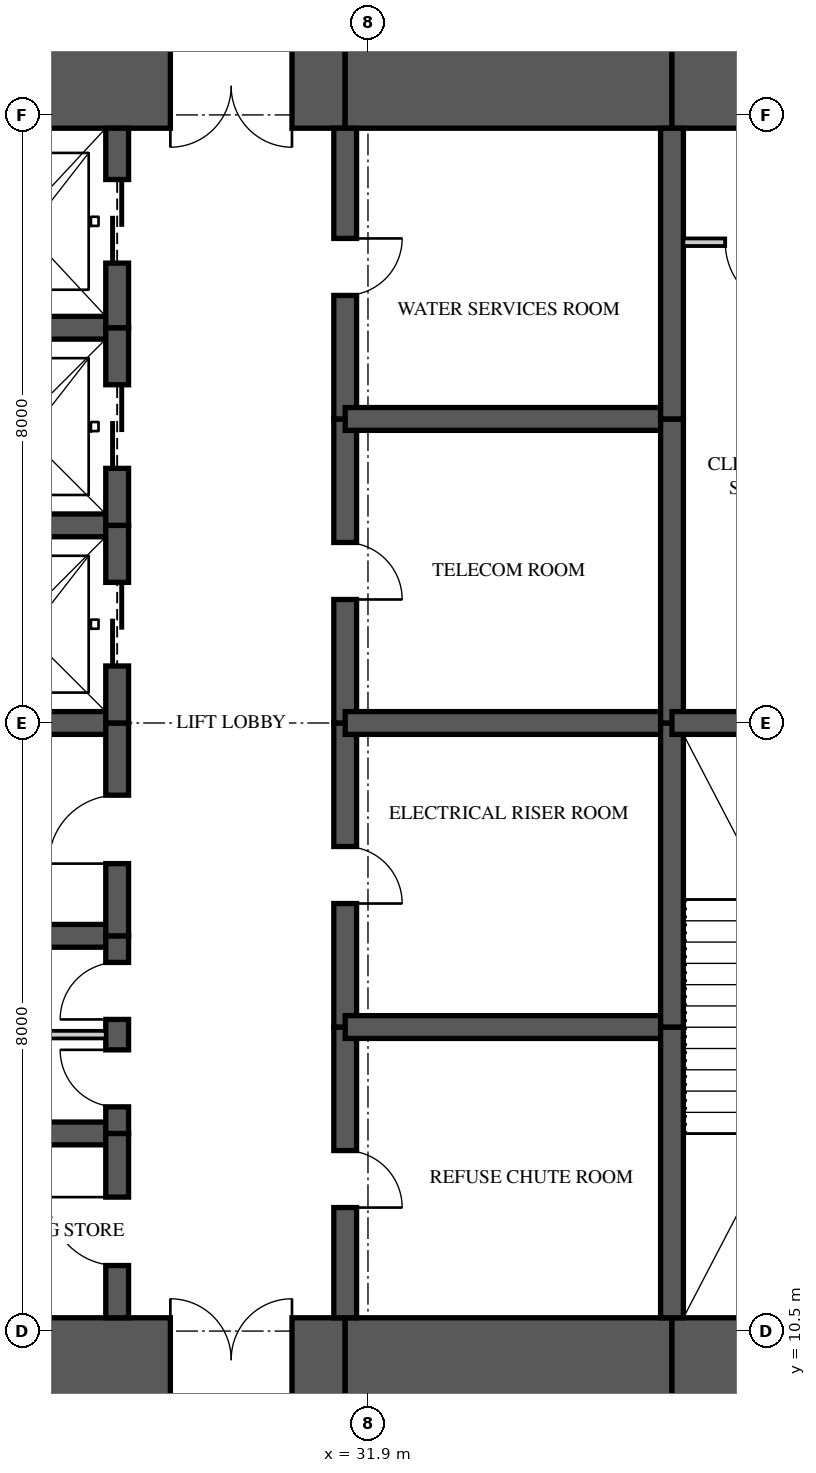
"""IFC4 building model, lengths in metres.
Left out: names, types, materials, properties, quantities, classifications, styles, units other than length and angle.
Written with IfcOpenShell. Run it as: python <this file> out.ifc"""

import sys

from ifc_helpers import new_model, si_unit, direction, frame, frame_2d, origin, place, context, subcontext, project, spatial, rectangle, extrude, element, fill, save


model = new_model("IFC4")
c1 = context("Model", 3, precision=1e-05, world=origin(), true_north=direction((0.0, 1.0)))
c2 = subcontext(c1, "Body", "Model", "MODEL_VIEW")
j1 = project(units=[si_unit("LENGTHUNIT", "METRE"), si_unit("PLANEANGLEUNIT", "RADIAN")], contexts=[c1])
p1 = place(None, origin())
s1 = spatial("IfcSite", under=j1, at=p1, CompositionType="ELEMENT")
p2 = place(p1, origin())
s2 = spatial("IfcBuilding", under=s1, at=p2, CompositionType="ELEMENT")
p3 = place(p2, frame((0.0, 0.0, 224.95)))
s3 = spatial("IfcBuildingStorey", under=s2, at=p3, CompositionType="ELEMENT", Elevation=224.95)
p4 = place(p3, frame((26.0, 10.125, 0.0), z_axis=(0.0, 0.0, 1.0), x_axis=(1.0, 0.0, 0.0)))
e1 = element("IfcWall", 1, at=p4, inside=s3, PredefinedType="SHEAR", context=c2, shape_type="SweptSolid", body=[
    extrude(rectangle(XDim=5.6, YDim=1.1, at=frame_2d((2.8, 0.0))), origin(), (0.0, 0.0, 1.0), 3.5),
])
p5 = place(p4, frame((3.3, 0.0, 0.0)))
e2 = element("IfcOpeningElement", 2, at=p5, cuts=e1, PredefinedType="OPENING", context=c2, shape_type="SweptSolid", body=[
    extrude(rectangle(XDim=1.6, YDim=2.1, at=frame_2d((0.8, 1.05))), frame((0.0, 0.56, 0.0), z_axis=(0.0, -1.0, 0.0), x_axis=(1.0, 0.0, 0.0)), (0.0, 0.0, 1.0), 1.12),
])
p6 = place(p3, frame((31.6, 10.125, 0.0), z_axis=(0.0, 0.0, 1.0), x_axis=(1.0, 0.0, 0.0)))
e3 = element("IfcWall", 3, at=p6, inside=s3, PredefinedType="SHEAR", context=c2, shape_type="SweptSolid", body=[
    extrude(rectangle(XDim=4.3, YDim=1.1, at=frame_2d((2.15, 0.0))), origin(), (0.0, 0.0, 1.0), 3.5),
])
p7 = place(p3, frame((35.9, 10.125, 0.0), z_axis=(0.0, 0.0, 1.0), x_axis=(1.0, 0.0, 0.0)))
e4 = element("IfcWall", 4, at=p7, inside=s3, PredefinedType="SHEAR", context=c2, shape_type="SweptSolid", body=[
    extrude(rectangle(XDim=8.175, YDim=1.1, at=frame_2d((4.087, 0.0))), origin(), (0.0, 0.0, 1.0), 3.5),
])
p8 = place(p7, frame((2.7, 0.0, 0.0)))
e5 = element("IfcOpeningElement", 5, at=p8, cuts=e4, PredefinedType="OPENING", context=c2, shape_type="SweptSolid", body=[
    extrude(rectangle(XDim=1.0, YDim=2.1, at=frame_2d((0.5, 1.05))), frame((0.0, 0.56, 0.0), z_axis=(0.0, -1.0, 0.0), x_axis=(1.0, 0.0, 0.0)), (0.0, 0.0, 1.0), 1.12),
])
p9 = place(p3, frame((44.075, 26.875, 0.0), z_axis=(0.0, 0.0, 1.0), x_axis=(-1.0, 0.0, 0.0)))
e6 = element("IfcWall", 6, at=p9, inside=s3, PredefinedType="SHEAR", context=c2, shape_type="SweptSolid", body=[
    extrude(rectangle(XDim=8.175, YDim=1.1, at=frame_2d((4.087, 0.0))), origin(), (0.0, 0.0, 1.0), 3.5),
])
p10 = place(p9, frame((5.575, 0.0, 0.0)))
e7 = element("IfcOpeningElement", 7, at=p10, cuts=e6, PredefinedType="OPENING", context=c2, shape_type="SweptSolid", body=[
    extrude(rectangle(XDim=0.9, YDim=2.1, at=frame_2d((0.45, 1.05))), frame((0.0, 0.56, 0.0), z_axis=(0.0, -1.0, 0.0), x_axis=(1.0, 0.0, 0.0)), (0.0, 0.0, 1.0), 1.12),
])
p11 = place(p3, frame((35.9, 26.875, 0.0), z_axis=(0.0, 0.0, 1.0), x_axis=(-1.0, 0.0, 0.0)))
e8 = element("IfcWall", 8, at=p11, inside=s3, PredefinedType="SHEAR", context=c2, shape_type="SweptSolid", body=[
    extrude(rectangle(XDim=4.3, YDim=1.1, at=frame_2d((2.15, 0.0))), origin(), (0.0, 0.0, 1.0), 3.5),
])
p12 = place(p3, frame((31.6, 26.875, 0.0), z_axis=(0.0, 0.0, 1.0), x_axis=(-1.0, 0.0, 0.0)))
e9 = element("IfcWall", 9, at=p12, inside=s3, PredefinedType="SHEAR", context=c2, shape_type="SweptSolid", body=[
    extrude(rectangle(XDim=5.6, YDim=1.1, at=frame_2d((2.8, 0.0))), origin(), (0.0, 0.0, 1.0), 3.5),
])
p13 = place(p12, frame((0.7, 0.0, 0.0)))
e10 = element("IfcOpeningElement", 10, at=p13, cuts=e9, PredefinedType="OPENING", context=c2, shape_type="SweptSolid", body=[
    extrude(rectangle(XDim=1.6, YDim=2.1, at=frame_2d((0.8, 1.05))), frame((0.0, 0.56, 0.0), z_axis=(0.0, -1.0, 0.0), x_axis=(1.0, 0.0, 0.0)), (0.0, 0.0, 1.0), 1.12),
])
p14 = place(p3, frame((28.6, 10.675, 0.0), z_axis=(0.0, 0.0, 1.0), x_axis=(0.0, 1.0, 0.0)))
e11 = element("IfcWall", 11, at=p14, inside=s3, PredefinedType="SHEAR", context=c2, shape_type="SweptSolid", body=[
    extrude(rectangle(XDim=2.425, YDim=0.3, at=frame_2d((1.212, 0.0))), origin(), (0.0, 0.0, 1.0), 3.5),
])
p15 = place(p14, frame((0.688, 0.0, 0.0)))
e12 = element("IfcOpeningElement", 12, at=p15, cuts=e11, PredefinedType="OPENING", context=c2, shape_type="SweptSolid", body=[
    extrude(rectangle(XDim=0.9, YDim=2.1, at=frame_2d((0.45, 1.05))), frame((0.0, 0.16, 0.0), z_axis=(0.0, -1.0, 0.0), x_axis=(1.0, 0.0, 0.0)), (0.0, 0.0, 1.0), 0.32),
])
p16 = place(p3, frame((28.6, 13.1, 0.0), z_axis=(0.0, 0.0, 1.0), x_axis=(0.0, 1.0, 0.0)))
e13 = element("IfcWall", 13, at=p16, inside=s3, PredefinedType="SHEAR", context=c2, shape_type="SweptSolid", body=[
    extrude(rectangle(XDim=2.6, YDim=0.3, at=frame_2d((1.3, 0.0))), origin(), (0.0, 0.0, 1.0), 3.5),
])
p17 = place(p16, frame((0.35, 0.0, 0.0)))
e14 = element("IfcOpeningElement", 14, at=p17, cuts=e13, PredefinedType="OPENING", context=c2, shape_type="SweptSolid", body=[
    extrude(rectangle(XDim=0.75, YDim=2.1, at=frame_2d((0.375, 1.05))), frame((0.0, 0.16, 0.0), z_axis=(0.0, -1.0, 0.0), x_axis=(1.0, 0.0, 0.0)), (0.0, 0.0, 1.0), 0.32),
])
p18 = place(p16, frame((1.5, 0.0, 0.0)))
e15 = element("IfcOpeningElement", 15, at=p18, cuts=e13, PredefinedType="OPENING", context=c2, shape_type="SweptSolid", body=[
    extrude(rectangle(XDim=0.75, YDim=2.1, at=frame_2d((0.375, 1.05))), frame((0.0, 0.16, 0.0), z_axis=(0.0, -1.0, 0.0), x_axis=(1.0, 0.0, 0.0)), (0.0, 0.0, 1.0), 0.32),
])
p19 = place(p3, frame((28.6, 15.7, 0.0), z_axis=(0.0, 0.0, 1.0), x_axis=(0.0, 1.0, 0.0)))
e16 = element("IfcWall", 16, at=p19, inside=s3, PredefinedType="SHEAR", context=c2, shape_type="SweptSolid", body=[
    extrude(rectangle(XDim=2.8, YDim=0.3, at=frame_2d((1.4, 0.0))), origin(), (0.0, 0.0, 1.0), 3.5),
])
p20 = place(p19, frame((0.95, 0.0, 0.0)))
e17 = element("IfcOpeningElement", 17, at=p20, cuts=e16, PredefinedType="OPENING", context=c2, shape_type="SweptSolid", body=[
    extrude(rectangle(XDim=0.9, YDim=2.1, at=frame_2d((0.45, 1.05))), frame((0.0, 0.16, 0.0), z_axis=(0.0, -1.0, 0.0), x_axis=(1.0, 0.0, 0.0)), (0.0, 0.0, 1.0), 0.32),
])
p21 = place(p3, frame((28.6, 18.5, 0.0), z_axis=(0.0, 0.0, 1.0), x_axis=(0.0, 1.0, 0.0)))
e18 = element("IfcWall", 18, at=p21, inside=s3, PredefinedType="SHEAR", context=c2, shape_type="SweptSolid", body=[
    extrude(rectangle(XDim=2.6, YDim=0.3, at=frame_2d((1.3, 0.0))), origin(), (0.0, 0.0, 1.0), 3.5),
])
p22 = place(p21, frame((0.75, 0.0, 0.0)))
e19 = element("IfcOpeningElement", 19, at=p22, cuts=e18, PredefinedType="OPENING", context=c2, shape_type="SweptSolid", body=[
    extrude(rectangle(XDim=1.1, YDim=2.1, at=frame_2d((0.55, 1.05))), frame((0.0, 0.16, 0.0), z_axis=(0.0, -1.0, 0.0), x_axis=(1.0, 0.0, 0.0)), (0.0, 0.0, 1.0), 0.32),
])
p23 = place(p3, frame((28.6, 21.1, 0.0), z_axis=(0.0, 0.0, 1.0), x_axis=(0.0, 1.0, 0.0)))
e20 = element("IfcWall", 20, at=p23, inside=s3, PredefinedType="SHEAR", context=c2, shape_type="SweptSolid", body=[
    extrude(rectangle(XDim=2.6, YDim=0.3, at=frame_2d((1.3, 0.0))), origin(), (0.0, 0.0, 1.0), 3.5),
])
p24 = place(p23, frame((0.75, 0.0, 0.0)))
e21 = element("IfcOpeningElement", 21, at=p24, cuts=e20, PredefinedType="OPENING", context=c2, shape_type="SweptSolid", body=[
    extrude(rectangle(XDim=1.1, YDim=2.1, at=frame_2d((0.55, 1.05))), frame((0.0, 0.16, 0.0), z_axis=(0.0, -1.0, 0.0), x_axis=(1.0, 0.0, 0.0)), (0.0, 0.0, 1.0), 0.32),
])
p25 = place(p3, frame((28.6, 23.7, 0.0), z_axis=(0.0, 0.0, 1.0), x_axis=(0.0, 1.0, 0.0)))
e22 = element("IfcWall", 22, at=p25, inside=s3, PredefinedType="SHEAR", context=c2, shape_type="SweptSolid", body=[
    extrude(rectangle(XDim=2.625, YDim=0.3, at=frame_2d((1.312, 0.0))), origin(), (0.0, 0.0, 1.0), 3.5),
])
p26 = place(p25, frame((0.85, 0.0, 0.0)))
e23 = element("IfcOpeningElement", 23, at=p26, cuts=e22, PredefinedType="OPENING", context=c2, shape_type="SweptSolid", body=[
    extrude(rectangle(XDim=1.1, YDim=2.1, at=frame_2d((0.55, 1.05))), frame((0.0, 0.16, 0.0), z_axis=(0.0, -1.0, 0.0), x_axis=(1.0, 0.0, 0.0)), (0.0, 0.0, 1.0), 0.32),
])
p27 = place(p3, frame((31.6, 10.675, 0.0), z_axis=(0.0, 0.0, 1.0), x_axis=(0.0, 1.0, 0.0)))
e24 = element("IfcWall", 24, at=p27, inside=s3, PredefinedType="SHEAR", context=c2, shape_type="SweptSolid", body=[
    extrude(rectangle(XDim=3.825, YDim=0.3, at=frame_2d((1.913, 0.0))), origin(), (0.0, 0.0, 1.0), 3.5),
])
p28 = place(p27, frame((1.45, 0.0, 0.0)))
e25 = element("IfcOpeningElement", 25, at=p28, cuts=e24, PredefinedType="OPENING", context=c2, shape_type="SweptSolid", body=[
    extrude(rectangle(XDim=0.75, YDim=2.1, at=frame_2d((0.375, 1.05))), frame((0.0, 0.16, 0.0), z_axis=(0.0, -1.0, 0.0), x_axis=(1.0, 0.0, 0.0)), (0.0, 0.0, 1.0), 0.32),
])
p29 = place(p3, frame((31.6, 14.5, 0.0), z_axis=(0.0, 0.0, 1.0), x_axis=(0.0, 1.0, 0.0)))
e26 = element("IfcWall", 26, at=p29, inside=s3, PredefinedType="SHEAR", context=c2, shape_type="SweptSolid", body=[
    extrude(rectangle(XDim=4.0, YDim=0.3, at=frame_2d((2.0, 0.0))), origin(), (0.0, 0.0, 1.0), 3.5),
])
p30 = place(p29, frame((1.625, 0.0, 0.0)))
e27 = element("IfcOpeningElement", 27, at=p30, cuts=e26, PredefinedType="OPENING", context=c2, shape_type="SweptSolid", body=[
    extrude(rectangle(XDim=0.75, YDim=2.1, at=frame_2d((0.375, 1.05))), frame((0.0, 0.16, 0.0), z_axis=(0.0, -1.0, 0.0), x_axis=(1.0, 0.0, 0.0)), (0.0, 0.0, 1.0), 0.32),
])
p31 = place(p3, frame((31.6, 18.5, 0.0), z_axis=(0.0, 0.0, 1.0), x_axis=(0.0, 1.0, 0.0)))
e28 = element("IfcWall", 28, at=p31, inside=s3, PredefinedType="SHEAR", context=c2, shape_type="SweptSolid", body=[
    extrude(rectangle(XDim=4.0, YDim=0.3, at=frame_2d((2.0, 0.0))), origin(), (0.0, 0.0, 1.0), 3.5),
])
p32 = place(p31, frame((1.625, 0.0, 0.0)))
e29 = element("IfcOpeningElement", 29, at=p32, cuts=e28, PredefinedType="OPENING", context=c2, shape_type="SweptSolid", body=[
    extrude(rectangle(XDim=0.75, YDim=2.1, at=frame_2d((0.375, 1.05))), frame((0.0, 0.16, 0.0), z_axis=(0.0, -1.0, 0.0), x_axis=(1.0, 0.0, 0.0)), (0.0, 0.0, 1.0), 0.32),
])
p33 = place(p3, frame((31.6, 22.5, 0.0), z_axis=(0.0, 0.0, 1.0), x_axis=(0.0, 1.0, 0.0)))
e30 = element("IfcWall", 30, at=p33, inside=s3, PredefinedType="SHEAR", context=c2, shape_type="SweptSolid", body=[
    extrude(rectangle(XDim=3.825, YDim=0.3, at=frame_2d((1.913, 0.0))), origin(), (0.0, 0.0, 1.0), 3.5),
])
p34 = place(p33, frame((1.625, 0.0, 0.0)))
e31 = element("IfcOpeningElement", 31, at=p34, cuts=e30, PredefinedType="OPENING", context=c2, shape_type="SweptSolid", body=[
    extrude(rectangle(XDim=0.75, YDim=2.1, at=frame_2d((0.375, 1.05))), frame((0.0, 0.16, 0.0), z_axis=(0.0, -1.0, 0.0), x_axis=(1.0, 0.0, 0.0)), (0.0, 0.0, 1.0), 0.32),
])
p35 = place(p3, frame((35.9, 10.675, 0.0), z_axis=(0.0, 0.0, 1.0), x_axis=(0.0, 1.0, 0.0)))
e32 = element("IfcWall", 32, at=p35, inside=s3, PredefinedType="SHEAR", context=c2, shape_type="SweptSolid", body=[
    extrude(rectangle(XDim=3.825, YDim=0.3, at=frame_2d((1.913, 0.0))), origin(), (0.0, 0.0, 1.0), 3.5),
])
for number, where, z_axis, x_axis in (
    (33, (35.9, 14.5, 0.0), (0.0, 0.0, 1.0), (0.0, 1.0, 0.0)),
    (34, (35.9, 18.5, 0.0), (0.0, 0.0, 1.0), (0.0, 1.0, 0.0)),
):
    element("IfcWall", number, at=place(p3, frame(where, z_axis=z_axis, x_axis=x_axis)), inside=s3, PredefinedType="SHEAR", context=c2, shape_type="SweptSolid", body=[
        extrude(rectangle(XDim=4.0, YDim=0.3, at=frame_2d((2.0, 0.0))), origin(), (0.0, 0.0, 1.0), 3.5),
    ])
p36 = place(p3, frame((35.9, 22.5, 0.0), z_axis=(0.0, 0.0, 1.0), x_axis=(0.0, 1.0, 0.0)))
e35 = element("IfcWall", 35, at=p36, inside=s3, PredefinedType="SHEAR", context=c2, shape_type="SweptSolid", body=[
    extrude(rectangle(XDim=3.825, YDim=0.3, at=frame_2d((1.913, 0.0))), origin(), (0.0, 0.0, 1.0), 3.5),
])
for number, where, z_axis, x_axis in (
    (36, (26.0, 13.1, 0.0), (0.0, 0.0, 1.0), (1.0, 0.0, 0.0)),
    (37, (26.0, 15.7, 0.0), (0.0, 0.0, 1.0), (1.0, 0.0, 0.0)),
    (38, (26.0, 18.5, 0.0), (0.0, 0.0, 1.0), (1.0, 0.0, 0.0)),
    (39, (26.0, 21.1, 0.0), (0.0, 0.0, 1.0), (1.0, 0.0, 0.0)),
    (40, (26.0, 23.7, 0.0), (0.0, 0.0, 1.0), (1.0, 0.0, 0.0)),
):
    element("IfcWall", number, at=place(p3, frame(where, z_axis=z_axis, x_axis=x_axis)), inside=s3, PredefinedType="SHEAR", context=c2, shape_type="SweptSolid", body=[
        extrude(rectangle(XDim=2.6, YDim=0.3, at=frame_2d((1.3, 0.0))), origin(), (0.0, 0.0, 1.0), 3.5),
    ])
for number, where, z_axis, x_axis in (
    (41, (31.6, 14.5, 0.0), (0.0, 0.0, 1.0), (1.0, 0.0, 0.0)),
    (42, (31.6, 18.5, 0.0), (0.0, 0.0, 1.0), (1.0, 0.0, 0.0)),
    (43, (31.6, 22.5, 0.0), (0.0, 0.0, 1.0), (1.0, 0.0, 0.0)),
):
    element("IfcWall", number, at=place(p3, frame(where, z_axis=z_axis, x_axis=x_axis)), inside=s3, PredefinedType="SHEAR", context=c2, shape_type="SweptSolid", body=[
        extrude(rectangle(XDim=4.3, YDim=0.3, at=frame_2d((2.15, 0.0))), origin(), (0.0, 0.0, 1.0), 3.5),
    ])
p37 = place(p3, frame((35.9, 18.5, 0.0), z_axis=(0.0, 0.0, 1.0), x_axis=(1.0, 0.0, 0.0)))
e44 = element("IfcWall", 44, at=p37, inside=s3, PredefinedType="SHEAR", context=c2, shape_type="SweptSolid", body=[
    extrude(rectangle(XDim=4.3, YDim=0.3, at=frame_2d((2.15, 0.0))), origin(), (0.0, 0.0, 1.0), 3.5),
])
p38 = place(p3, frame((36.05, 24.825, 0.0), z_axis=(0.0, 0.0, 1.0), x_axis=(1.0, 0.0, 0.0)))
e45 = element("IfcWall", 45, at=p38, inside=s3, PredefinedType="PARTITIONING", context=c2, shape_type="SweptSolid", body=[
    extrude(rectangle(XDim=4.0, YDim=0.1, at=frame_2d((2.0, 0.0))), origin(), (0.0, 0.0, 1.0), 3.26),
])
p39 = place(p38, frame((0.55, 0.0, 0.0)))
e46 = element("IfcOpeningElement", 46, at=p39, cuts=e45, PredefinedType="OPENING", context=c2, shape_type="SweptSolid", body=[
    extrude(rectangle(XDim=0.9, YDim=2.1, at=frame_2d((0.45, 1.05))), frame((0.0, 0.06, 0.0), z_axis=(0.0, -1.0, 0.0), x_axis=(1.0, 0.0, 0.0)), (0.0, 0.0, 1.0), 0.12),
])
p40 = place(p38, frame((2.55, 0.0, 0.0)))
e47 = element("IfcOpeningElement", 47, at=p40, cuts=e45, PredefinedType="OPENING", context=c2, shape_type="SweptSolid", body=[
    extrude(rectangle(XDim=0.9, YDim=2.1, at=frame_2d((0.45, 1.05))), frame((0.0, 0.06, 0.0), z_axis=(0.0, -1.0, 0.0), x_axis=(1.0, 0.0, 0.0)), (0.0, 0.0, 1.0), 0.12),
])
p41 = place(p3, frame((26.15, 14.4, 0.0), z_axis=(0.0, 0.0, 1.0), x_axis=(1.0, 0.0, 0.0)))
e48 = element("IfcWall", 48, at=p41, inside=s3, PredefinedType="PARTITIONING", context=c2, shape_type="SweptSolid", body=[
    extrude(rectangle(XDim=2.3, YDim=0.1, at=frame_2d((1.15, 0.0))), origin(), (0.0, 0.0, 1.0), 3.26),
])
p42 = place(p39, frame((0.9, 0.0, 0.0), z_axis=(0.0, 0.0, 1.0), x_axis=(-1.0, 0.0, 0.0)))
e49 = element("IfcDoor", 49, at=p42, inside=s3, OperationType="SINGLE_SWING_LEFT", PredefinedType="DOOR", context=c2, shape_type="SweptSolid", body=[
    extrude(rectangle(XDim=0.9, YDim=2.1, at=frame_2d((0.45, 1.05))), frame((0.0, 0.025, 0.0), z_axis=(0.0, -1.0, 0.0), x_axis=(1.0, 0.0, 0.0)), (0.0, 0.0, 1.0), 0.05),
])
fill(e46, e49)
p43 = place(p22, origin())
e50 = element("IfcDoor", 50, at=p43, inside=s3, OperationType="SLIDING_TO_LEFT", PredefinedType="DOOR", context=c2, shape_type="SweptSolid", body=[
    extrude(rectangle(XDim=1.1, YDim=2.1, at=frame_2d((0.55, 1.05))), frame((0.0, 0.025, 0.0), z_axis=(0.0, -1.0, 0.0), x_axis=(1.0, 0.0, 0.0)), (0.0, 0.0, 1.0), 0.05),
])
fill(e19, e50)
p44 = place(p24, origin())
e51 = element("IfcDoor", 51, at=p44, inside=s3, OperationType="SLIDING_TO_LEFT", PredefinedType="DOOR", context=c2, shape_type="SweptSolid", body=[
    extrude(rectangle(XDim=1.1, YDim=2.1, at=frame_2d((0.55, 1.05))), frame((0.0, 0.025, 0.0), z_axis=(0.0, -1.0, 0.0), x_axis=(1.0, 0.0, 0.0)), (0.0, 0.0, 1.0), 0.05),
])
fill(e21, e51)
p45 = place(p26, origin())
e52 = element("IfcDoor", 52, at=p45, inside=s3, OperationType="SLIDING_TO_LEFT", PredefinedType="DOOR", context=c2, shape_type="SweptSolid", body=[
    extrude(rectangle(XDim=1.1, YDim=2.1, at=frame_2d((0.55, 1.05))), frame((0.0, 0.025, 0.0), z_axis=(0.0, -1.0, 0.0), x_axis=(1.0, 0.0, 0.0)), (0.0, 0.0, 1.0), 0.05),
])
fill(e23, e52)
p46 = place(p15, origin())
e53 = element("IfcDoor", 53, at=p46, inside=s3, OperationType="SINGLE_SWING_RIGHT", PredefinedType="DOOR", context=c2, shape_type="SweptSolid", body=[
    extrude(rectangle(XDim=0.9, YDim=2.1, at=frame_2d((0.45, 1.05))), frame((0.0, 0.025, 0.0), z_axis=(0.0, -1.0, 0.0), x_axis=(1.0, 0.0, 0.0)), (0.0, 0.0, 1.0), 0.05),
])
fill(e12, e53)
p47 = place(p17, origin())
e54 = element("IfcDoor", 54, at=p47, inside=s3, OperationType="SINGLE_SWING_RIGHT", PredefinedType="DOOR", context=c2, shape_type="SweptSolid", body=[
    extrude(rectangle(XDim=0.75, YDim=2.1, at=frame_2d((0.375, 1.05))), frame((0.0, 0.025, 0.0), z_axis=(0.0, -1.0, 0.0), x_axis=(1.0, 0.0, 0.0)), (0.0, 0.0, 1.0), 0.05),
])
fill(e14, e54)
p48 = place(p18, origin())
e55 = element("IfcDoor", 55, at=p48, inside=s3, OperationType="SINGLE_SWING_LEFT", PredefinedType="DOOR", context=c2, shape_type="SweptSolid", body=[
    extrude(rectangle(XDim=0.75, YDim=2.1, at=frame_2d((0.375, 1.05))), frame((0.0, 0.025, 0.0), z_axis=(0.0, -1.0, 0.0), x_axis=(1.0, 0.0, 0.0)), (0.0, 0.0, 1.0), 0.05),
])
fill(e15, e55)
p49 = place(p20, origin())
e56 = element("IfcDoor", 56, at=p49, inside=s3, OperationType="SINGLE_SWING_LEFT", PredefinedType="DOOR", context=c2, shape_type="SweptSolid", body=[
    extrude(rectangle(XDim=0.9, YDim=2.1, at=frame_2d((0.45, 1.05))), frame((0.0, 0.025, 0.0), z_axis=(0.0, -1.0, 0.0), x_axis=(1.0, 0.0, 0.0)), (0.0, 0.0, 1.0), 0.05),
])
fill(e17, e56)
p50 = place(p5, origin())
e57 = element("IfcDoor", 57, at=p50, inside=s3, OperationType="DOUBLE_DOOR_SINGLE_SWING", PredefinedType="DOOR", context=c2, shape_type="SweptSolid", body=[
    extrude(rectangle(XDim=1.6, YDim=2.1, at=frame_2d((0.8, 1.05))), frame((0.0, 0.025, 0.0), z_axis=(0.0, -1.0, 0.0), x_axis=(1.0, 0.0, 0.0)), (0.0, 0.0, 1.0), 0.05),
])
fill(e2, e57)
p51 = place(p13, origin())
e58 = element("IfcDoor", 58, at=p51, inside=s3, OperationType="DOUBLE_DOOR_SINGLE_SWING", PredefinedType="DOOR", context=c2, shape_type="SweptSolid", body=[
    extrude(rectangle(XDim=1.6, YDim=2.1, at=frame_2d((0.8, 1.05))), frame((0.0, 0.025, 0.0), z_axis=(0.0, -1.0, 0.0), x_axis=(1.0, 0.0, 0.0)), (0.0, 0.0, 1.0), 0.05),
])
fill(e10, e58)
p52 = place(p28, frame((0.75, 0.0, 0.0), z_axis=(0.0, 0.0, 1.0), x_axis=(-1.0, 0.0, 0.0)))
e59 = element("IfcDoor", 59, at=p52, inside=s3, OperationType="SINGLE_SWING_RIGHT", PredefinedType="DOOR", context=c2, shape_type="SweptSolid", body=[
    extrude(rectangle(XDim=0.75, YDim=2.1, at=frame_2d((0.375, 1.05))), frame((0.0, 0.025, 0.0), z_axis=(0.0, -1.0, 0.0), x_axis=(1.0, 0.0, 0.0)), (0.0, 0.0, 1.0), 0.05),
])
fill(e25, e59)
p53 = place(p30, frame((0.75, 0.0, 0.0), z_axis=(0.0, 0.0, 1.0), x_axis=(-1.0, 0.0, 0.0)))
e60 = element("IfcDoor", 60, at=p53, inside=s3, OperationType="SINGLE_SWING_RIGHT", PredefinedType="DOOR", context=c2, shape_type="SweptSolid", body=[
    extrude(rectangle(XDim=0.75, YDim=2.1, at=frame_2d((0.375, 1.05))), frame((0.0, 0.025, 0.0), z_axis=(0.0, -1.0, 0.0), x_axis=(1.0, 0.0, 0.0)), (0.0, 0.0, 1.0), 0.05),
])
fill(e27, e60)
p54 = place(p32, frame((0.75, 0.0, 0.0), z_axis=(0.0, 0.0, 1.0), x_axis=(-1.0, 0.0, 0.0)))
e61 = element("IfcDoor", 61, at=p54, inside=s3, OperationType="SINGLE_SWING_RIGHT", PredefinedType="DOOR", context=c2, shape_type="SweptSolid", body=[
    extrude(rectangle(XDim=0.75, YDim=2.1, at=frame_2d((0.375, 1.05))), frame((0.0, 0.025, 0.0), z_axis=(0.0, -1.0, 0.0), x_axis=(1.0, 0.0, 0.0)), (0.0, 0.0, 1.0), 0.05),
])
fill(e29, e61)
p55 = place(p34, frame((0.75, 0.0, 0.0), z_axis=(0.0, 0.0, 1.0), x_axis=(-1.0, 0.0, 0.0)))
e62 = element("IfcDoor", 62, at=p55, inside=s3, OperationType="SINGLE_SWING_LEFT", PredefinedType="DOOR", context=c2, shape_type="SweptSolid", body=[
    extrude(rectangle(XDim=0.75, YDim=2.1, at=frame_2d((0.375, 1.05))), frame((0.0, 0.025, 0.0), z_axis=(0.0, -1.0, 0.0), x_axis=(1.0, 0.0, 0.0)), (0.0, 0.0, 1.0), 0.05),
])
fill(e31, e62)
save(model, sys.argv[1])
